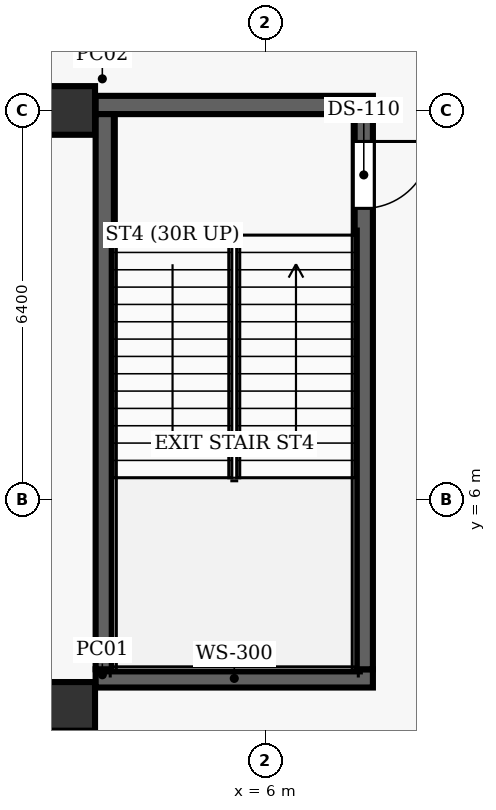
"""IFC4 building model, lengths in metres.
Left out: names, types, materials, properties, quantities, classifications, styles, units other than length and angle.
Written with IfcOpenShell. Run it as: python <this file> out.ifc"""

import sys

from ifc_helpers import new_model, si_unit, direction, frame, frame_2d, origin, origin_2d, place, context, subcontext, project, spatial, rectangle, extrude, element, fill, save


model = new_model("IFC4")
c1 = context("Model", 3, precision=1e-05, world=origin(), true_north=direction((0.0, 1.0)))
c2 = subcontext(c1, "Body", "Model", "MODEL_VIEW")
j1 = project(units=[si_unit("LENGTHUNIT", "METRE"), si_unit("PLANEANGLEUNIT", "RADIAN")], contexts=[c1])
p1 = place(None, origin())
s1 = spatial("IfcSite", under=j1, at=p1, CompositionType="ELEMENT")
p2 = place(p1, origin())
s2 = spatial("IfcBuilding", under=s1, at=p2, CompositionType="ELEMENT")
p3 = place(p2, frame((0.0, 0.0, 30.0)))
s3 = spatial("IfcBuildingStorey", under=s2, at=p3, CompositionType="ELEMENT", Elevation=30.0)
for number, where, z_axis, x_axis in (
    (1, (2.8, 2.6, 0.0), (0.0, 0.0, 1.0), (1.0, 0.0, 0.0)),
    (2, (2.8, 12.4, 0.0), (0.0, 0.0, 1.0), (1.0, 0.0, 0.0)),
):
    element("IfcColumn", number, at=place(p3, frame(where, z_axis=z_axis, x_axis=x_axis)), inside=s3, PredefinedType="COLUMN", context=c2, shape_type="SweptSolid", body=[
        extrude(rectangle(XDim=0.8, YDim=0.8, at=origin_2d()), origin(), (0.0, 0.0, 1.0), 5.4),
    ])
for number, where, z_axis, x_axis in (
    (3, (3.21, 3.06, 0.0), (0.0, 0.0, 1.0), (1.0, 0.0, 0.0)),
    (4, (3.21, 12.49, 0.0), (0.0, 0.0, 1.0), (1.0, 0.0, 0.0)),
):
    element("IfcWall", number, at=place(p3, frame(where, z_axis=z_axis, x_axis=x_axis)), inside=s3, PredefinedType="SHEAR", context=c2, shape_type="SweptSolid", body=[
        extrude(rectangle(XDim=4.56, YDim=0.3, at=frame_2d((2.28, 0.0))), origin(), (0.0, 0.0, 1.0), 5.4),
    ])
p4 = place(p3, frame((3.36, 3.21, 0.0), z_axis=(0.0, 0.0, 1.0), x_axis=(0.0, 1.0, 0.0)))
e5 = element("IfcWall", 5, at=p4, inside=s3, PredefinedType="SHEAR", context=c2, shape_type="SweptSolid", body=[
    extrude(rectangle(XDim=9.13, YDim=0.3, at=frame_2d((4.565, 0.0))), origin(), (0.0, 0.0, 1.0), 5.4),
])
p5 = place(p3, frame((7.62, 12.34, 0.0), z_axis=(0.0, 0.0, 1.0), x_axis=(0.0, -1.0, 0.0)))
e6 = element("IfcWall", 6, at=p5, inside=s3, PredefinedType="SHEAR", context=c2, shape_type="SweptSolid", body=[
    extrude(rectangle(XDim=9.13, YDim=0.3, at=frame_2d((4.565, 0.0))), origin(), (0.0, 0.0, 1.0), 5.4),
])
p6 = place(p5, frame((0.45, 0.0, 0.0)))
e7 = element("IfcOpeningElement", 7, at=p6, cuts=e6, PredefinedType="OPENING", context=c2, shape_type="SweptSolid", body=[
    extrude(rectangle(XDim=1.1, YDim=2.15, at=frame_2d((0.55, 1.075))), frame((0.0, 0.16, 0.0), z_axis=(0.0, -1.0, 0.0), x_axis=(1.0, 0.0, 0.0)), (0.0, 0.0, 1.0), 0.32),
])
p7 = place(p6, origin())
e8 = element("IfcDoor", 8, at=p7, inside=s3, OperationType="SINGLE_SWING_LEFT", PredefinedType="DOOR", context=c2, shape_type="SweptSolid", body=[
    extrude(rectangle(XDim=1.1, YDim=2.15, at=frame_2d((0.55, 1.075))), frame((0.0, 0.025, 0.0), z_axis=(0.0, -1.0, 0.0), x_axis=(1.0, 0.0, 0.0)), (0.0, 0.0, 1.0), 0.05),
])
fill(e7, e8)
save(model, sys.argv[1])
